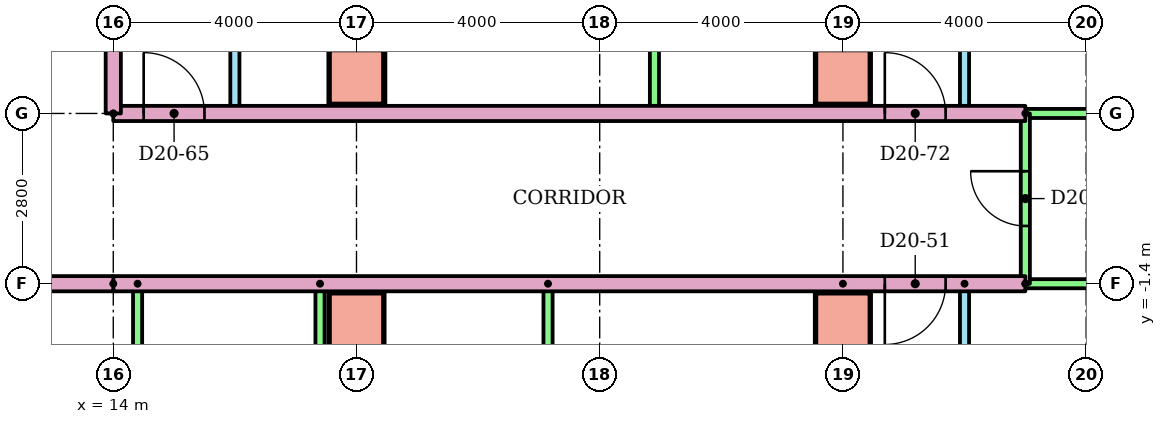
"""IFC4 building model, lengths in metres.
Left out: names, types, materials, properties, quantities, classifications, styles, units other than length and angle.
Written with IfcOpenShell. Run it as: python <this file> out.ifc"""

import sys

from ifc_helpers import new_model, si_unit, direction, frame, frame_2d, origin, origin_2d, place, context, subcontext, project, spatial, rectangle, extrude, element, fill, save


model = new_model("IFC4")
c1 = context("Model", 3, precision=1e-05, world=origin(), true_north=direction((0.0, 1.0)))
c2 = subcontext(c1, "Body", "Model", "MODEL_VIEW")
j1 = project(units=[si_unit("LENGTHUNIT", "METRE"), si_unit("PLANEANGLEUNIT", "RADIAN")], contexts=[c1])
p1 = place(None, origin())
s1 = spatial("IfcSite", under=j1, at=p1, CompositionType="ELEMENT")
p2 = place(p1, origin())
s2 = spatial("IfcBuilding", under=s1, at=p2, CompositionType="ELEMENT")
p3 = place(p2, frame((0.0, 0.0, 80.7)))
s3 = spatial("IfcBuildingStorey", under=s2, at=p3, CompositionType="ELEMENT", Elevation=80.7)
for number, where in (
    (1, (18.0, -2.0, 0.0)),
    (2, (26.0, -2.0, 0.0)),
    (3, (18.0, 2.0, 0.0)),
    (4, (26.0, 2.0, 0.0)),
):
    element("IfcColumn", number, at=place(p3, frame(where)), inside=s3, PredefinedType="COLUMN", context=c2, shape_type="SweptSolid", body=[
        extrude(rectangle(XDim=0.9, YDim=0.9, at=origin_2d()), origin(), (0.0, 0.0, 1.0), 3.2),
    ])
for number, where, z_axis, x_axis in (
    (5, (14.4, -1.4, 0.0), (0.0, 0.0, 1.0), (0.0, -1.0, 0.0)),
    (6, (17.4, -1.4, 0.0), (0.0, 0.0, 1.0), (0.0, -1.0, 0.0)),
    (7, (21.15, -1.4, 0.0), (0.0, 0.0, 1.0), (0.0, -1.0, 0.0)),
):
    element("IfcWall", number, at=place(p3, frame(where, z_axis=z_axis, x_axis=x_axis)), inside=s3, PredefinedType="PARTITIONING", context=c2, shape_type="SweptSolid", body=[
        extrude(rectangle(XDim=6.5, YDim=0.15, at=frame_2d((3.25, 0.0))), origin(), (0.0, 0.0, 1.0), 2.4),
    ])
p4 = place(p3, frame((28.0, -1.4, 0.0), z_axis=(0.0, 0.0, 1.0), x_axis=(0.0, -1.0, 0.0)))
e8 = element("IfcWall", 8, at=p4, inside=s3, PredefinedType="PARTITIONING", context=c2, shape_type="SweptSolid", body=[
    extrude(rectangle(XDim=6.5, YDim=0.15, at=frame_2d((3.25, 0.0))), origin(), (0.0, 0.0, 1.0), 2.4),
])
p5 = place(p4, frame((1.3, 0.0, 0.0)))
e9 = element("IfcOpeningElement", 9, at=p5, cuts=e8, PredefinedType="OPENING", context=c2, shape_type="SweptSolid", body=[
    extrude(rectangle(XDim=0.9, YDim=2.1, at=frame_2d((0.45, 1.05))), frame((0.0, 0.085, 0.0), z_axis=(0.0, -1.0, 0.0), x_axis=(1.0, 0.0, 0.0)), (0.0, 0.0, 1.0), 0.17),
])
p6 = place(p4, frame((4.6, 0.0, 0.0)))
e10 = element("IfcOpeningElement", 10, at=p6, cuts=e8, PredefinedType="OPENING", context=c2, shape_type="SweptSolid", body=[
    extrude(rectangle(XDim=0.8, YDim=2.1, at=frame_2d((0.4, 1.05))), frame((0.0, 0.085, 0.0), z_axis=(0.0, -1.0, 0.0), x_axis=(1.0, 0.0, 0.0)), (0.0, 0.0, 1.0), 0.17),
])
p7 = place(p3, frame((26.0, -1.4, 0.0), z_axis=(0.0, 0.0, 1.0), x_axis=(0.0, -1.0, 0.0)))
e11 = element("IfcWall", 11, at=p7, inside=s3, PredefinedType="PARTITIONING", context=c2, shape_type="SweptSolid", body=[
    extrude(rectangle(XDim=14.81, YDim=0.25, at=frame_2d((7.405, 0.0))), origin(), (0.0, 0.0, 1.0), 2.4),
])
p8 = place(p3, frame((29.0, -1.4, 0.0), z_axis=(0.0, 0.0, 1.0), x_axis=(-1.0, 0.0, 0.0)))
e12 = element("IfcWall", 12, at=p8, inside=s3, PredefinedType="PARTITIONING", context=c2, shape_type="SweptSolid", body=[
    extrude(rectangle(XDim=15.0, YDim=0.25, at=frame_2d((7.5, 0.0))), origin(), (0.0, 0.0, 1.0), 2.4),
])
p9 = place(p8, frame((1.311, 0.0, 0.0)))
e13 = element("IfcOpeningElement", 13, at=p9, cuts=e12, PredefinedType="OPENING", context=c2, shape_type="SweptSolid", body=[
    extrude(rectangle(XDim=1.0, YDim=2.1, at=frame_2d((0.5, 1.05))), frame((0.0, 0.135, 0.0), z_axis=(0.0, -1.0, 0.0), x_axis=(1.0, 0.0, 0.0)), (0.0, 0.0, 1.0), 0.27),
])
p10 = place(p3, frame((40.62, -1.4, 0.0), z_axis=(0.0, 0.0, 1.0), x_axis=(-1.0, 0.0, 0.0)))
e14 = element("IfcWall", 14, at=p10, inside=s3, PredefinedType="PARTITIONING", context=c2, shape_type="SweptSolid", body=[
    extrude(rectangle(XDim=11.62, YDim=0.15, at=frame_2d((5.81, 0.0))), origin(), (0.0, 0.0, 1.0), 2.4),
])
p11 = place(p3, frame((16.0, 10.3, 0.0), z_axis=(0.0, 0.0, 1.0), x_axis=(0.0, -1.0, 0.0)))
e15 = element("IfcWall", 15, at=p11, inside=s3, PredefinedType="PARTITIONING", context=c2, shape_type="SweptSolid", body=[
    extrude(rectangle(XDim=8.9, YDim=0.15, at=frame_2d((4.45, 0.0))), origin(), (0.0, 0.0, 1.0), 2.4),
])
p12 = place(p11, frame((5.95, 0.0, 0.0)))
e16 = element("IfcOpeningElement", 16, at=p12, cuts=e15, PredefinedType="OPENING", context=c2, shape_type="SweptSolid", body=[
    extrude(rectangle(XDim=0.9, YDim=2.1, at=frame_2d((0.45, 1.05))), frame((0.0, 0.085, 0.0), z_axis=(0.0, -1.0, 0.0), x_axis=(1.0, 0.0, 0.0)), (0.0, 0.0, 1.0), 0.17),
])
p13 = place(p11, frame((1.55, 0.0, 0.0)))
e17 = element("IfcOpeningElement", 17, at=p13, cuts=e15, PredefinedType="OPENING", context=c2, shape_type="SweptSolid", body=[
    extrude(rectangle(XDim=0.8, YDim=2.1, at=frame_2d((0.4, 1.05))), frame((0.0, 0.085, 0.0), z_axis=(0.0, -1.0, 0.0), x_axis=(1.0, 0.0, 0.0)), (0.0, 0.0, 1.0), 0.17),
])
for number, where, z_axis, x_axis in (
    (18, (18.4, 10.3, 0.0), (0.0, 0.0, 1.0), (0.0, -1.0, 0.0)),
    (19, (22.9, 10.3, 0.0), (0.0, 0.0, 1.0), (0.0, -1.0, 0.0)),
):
    element("IfcWall", number, at=place(p3, frame(where, z_axis=z_axis, x_axis=x_axis)), inside=s3, PredefinedType="PARTITIONING", context=c2, shape_type="SweptSolid", body=[
        extrude(rectangle(XDim=8.9, YDim=0.15, at=frame_2d((4.45, 0.0))), origin(), (0.0, 0.0, 1.0), 2.4),
    ])
p14 = place(p3, frame((28.0, 10.3, 0.0), z_axis=(0.0, 0.0, 1.0), x_axis=(0.0, -1.0, 0.0)))
e20 = element("IfcWall", 20, at=p14, inside=s3, PredefinedType="PARTITIONING", context=c2, shape_type="SweptSolid", body=[
    extrude(rectangle(XDim=8.9, YDim=0.15, at=frame_2d((4.45, 0.0))), origin(), (0.0, 0.0, 1.0), 2.4),
])
p15 = place(p14, frame((5.95, 0.0, 0.0)))
e21 = element("IfcOpeningElement", 21, at=p15, cuts=e20, PredefinedType="OPENING", context=c2, shape_type="SweptSolid", body=[
    extrude(rectangle(XDim=0.9, YDim=2.1, at=frame_2d((0.45, 1.05))), frame((0.0, 0.085, 0.0), z_axis=(0.0, -1.0, 0.0), x_axis=(1.0, 0.0, 0.0)), (0.0, 0.0, 1.0), 0.17),
])
p16 = place(p14, frame((1.55, 0.0, 0.0)))
e22 = element("IfcOpeningElement", 22, at=p16, cuts=e20, PredefinedType="OPENING", context=c2, shape_type="SweptSolid", body=[
    extrude(rectangle(XDim=0.8, YDim=2.1, at=frame_2d((0.4, 1.05))), frame((0.0, 0.085, 0.0), z_axis=(0.0, -1.0, 0.0), x_axis=(1.0, 0.0, 0.0)), (0.0, 0.0, 1.0), 0.17),
])
p17 = place(p3, frame((26.0, 18.621, 0.0), z_axis=(0.0, 0.0, 1.0), x_axis=(0.0, -1.0, 0.0)))
e23 = element("IfcWall", 23, at=p17, inside=s3, PredefinedType="PARTITIONING", context=c2, shape_type="SweptSolid", body=[
    extrude(rectangle(XDim=17.221, YDim=0.25, at=frame_2d((8.611, 0.0))), origin(), (0.0, 0.0, 1.0), 2.4),
])
p18 = place(p3, frame((14.0, 1.4, 0.0)))
e24 = element("IfcWall", 24, at=p18, inside=s3, PredefinedType="PARTITIONING", context=c2, shape_type="SweptSolid", body=[
    extrude(rectangle(XDim=15.0, YDim=0.25, at=frame_2d((7.5, 0.0))), origin(), (0.0, 0.0, 1.0), 2.4),
])
p19 = place(p18, frame((0.5, 0.0, 0.0)))
e25 = element("IfcOpeningElement", 25, at=p19, cuts=e24, PredefinedType="OPENING", context=c2, shape_type="SweptSolid", body=[
    extrude(rectangle(XDim=1.0, YDim=2.1, at=frame_2d((0.5, 1.05))), frame((0.0, 0.135, 0.0), z_axis=(0.0, -1.0, 0.0), x_axis=(1.0, 0.0, 0.0)), (0.0, 0.0, 1.0), 0.27),
])
p20 = place(p18, frame((12.689, 0.0, 0.0)))
e26 = element("IfcOpeningElement", 26, at=p20, cuts=e24, PredefinedType="OPENING", context=c2, shape_type="SweptSolid", body=[
    extrude(rectangle(XDim=1.0, YDim=2.1, at=frame_2d((0.5, 1.05))), frame((0.0, 0.135, 0.0), z_axis=(0.0, -1.0, 0.0), x_axis=(1.0, 0.0, 0.0)), (0.0, 0.0, 1.0), 0.27),
])
p21 = place(p3, frame((29.0, 1.4, 0.0)))
e27 = element("IfcWall", 27, at=p21, inside=s3, PredefinedType="PARTITIONING", context=c2, shape_type="SweptSolid", body=[
    extrude(rectangle(XDim=11.62, YDim=0.15, at=frame_2d((5.81, 0.0))), origin(), (0.0, 0.0, 1.0), 2.4),
])
p22 = place(p3, frame((29.0, -1.4, 0.0), z_axis=(0.0, 0.0, 1.0), x_axis=(0.0, 1.0, 0.0)))
e28 = element("IfcWall", 28, at=p22, inside=s3, PredefinedType="PARTITIONING", context=c2, shape_type="SweptSolid", body=[
    extrude(rectangle(XDim=2.8, YDim=0.15, at=frame_2d((1.4, 0.0))), origin(), (0.0, 0.0, 1.0), 2.4),
])
p23 = place(p22, frame((0.95, 0.0, 0.0)))
e29 = element("IfcOpeningElement", 29, at=p23, cuts=e28, PredefinedType="OPENING", context=c2, shape_type="SweptSolid", body=[
    extrude(rectangle(XDim=0.9, YDim=2.1, at=frame_2d((0.45, 1.05))), frame((0.0, 0.085, 0.0), z_axis=(0.0, -1.0, 0.0), x_axis=(1.0, 0.0, 0.0)), (0.0, 0.0, 1.0), 0.17),
])
p24 = place(p3, frame((14.0, -1.4, 0.0), z_axis=(0.0, 0.0, 1.0), x_axis=(-1.0, 0.0, 0.0)))
e30 = element("IfcWall", 30, at=p24, inside=s3, PredefinedType="PARTITIONING", context=c2, shape_type="SweptSolid", body=[
    extrude(rectangle(XDim=28.0, YDim=0.25, at=frame_2d((14.0, 0.0))), origin(), (0.0, 0.0, 1.0), 2.4),
])
p25 = place(p24, frame((20.689, 0.0, 0.0)))
e31 = element("IfcOpeningElement", 31, at=p25, cuts=e30, PredefinedType="OPENING", context=c2, shape_type="SweptSolid", body=[
    extrude(rectangle(XDim=1.0, YDim=2.1, at=frame_2d((0.5, 1.05))), frame((0.0, 0.135, 0.0), z_axis=(0.0, -1.0, 0.0), x_axis=(1.0, 0.0, 0.0)), (0.0, 0.0, 1.0), 0.27),
])
p26 = place(p24, frame((18.311, 0.0, 0.0)))
e32 = element("IfcOpeningElement", 32, at=p26, cuts=e30, PredefinedType="OPENING", context=c2, shape_type="SweptSolid", body=[
    extrude(rectangle(XDim=1.0, YDim=2.1, at=frame_2d((0.5, 1.05))), frame((0.0, 0.135, 0.0), z_axis=(0.0, -1.0, 0.0), x_axis=(1.0, 0.0, 0.0)), (0.0, 0.0, 1.0), 0.27),
])
p27 = place(p24, frame((2.311, 0.0, 0.0)))
e33 = element("IfcOpeningElement", 33, at=p27, cuts=e30, PredefinedType="OPENING", context=c2, shape_type="SweptSolid", body=[
    extrude(rectangle(XDim=1.0, YDim=2.1, at=frame_2d((0.5, 1.05))), frame((0.0, 0.135, 0.0), z_axis=(0.0, -1.0, 0.0), x_axis=(1.0, 0.0, 0.0)), (0.0, 0.0, 1.0), 0.27),
])
p28 = place(p3, frame((14.0, 1.4, 0.0), z_axis=(0.0, 0.0, 1.0), x_axis=(0.0, 1.0, 0.0)))
e34 = element("IfcWall", 34, at=p28, inside=s3, PredefinedType="PARTITIONING", context=c2, shape_type="SweptSolid", body=[
    extrude(rectangle(XDim=1.6, YDim=0.25, at=frame_2d((0.8, 0.0))), origin(), (0.0, 0.0, 1.0), 2.4),
])
p29 = place(p9, origin())
e35 = element("IfcDoor", 35, at=p29, inside=s3, OperationType="SINGLE_SWING_RIGHT", PredefinedType="DOOR", context=c2, shape_type="SweptSolid", body=[
    extrude(rectangle(XDim=1.0, YDim=2.1, at=frame_2d((0.5, 1.05))), frame((0.0, 0.025, 0.0), z_axis=(0.0, -1.0, 0.0), x_axis=(1.0, 0.0, 0.0)), (0.0, 0.0, 1.0), 0.05),
])
fill(e13, e35)
p30 = place(p19, origin())
e36 = element("IfcDoor", 36, at=p30, inside=s3, OperationType="SINGLE_SWING_LEFT", PredefinedType="DOOR", context=c2, shape_type="SweptSolid", body=[
    extrude(rectangle(XDim=1.0, YDim=2.1, at=frame_2d((0.5, 1.05))), frame((0.0, 0.025, 0.0), z_axis=(0.0, -1.0, 0.0), x_axis=(1.0, 0.0, 0.0)), (0.0, 0.0, 1.0), 0.05),
])
fill(e25, e36)
p31 = place(p20, origin())
e37 = element("IfcDoor", 37, at=p31, inside=s3, OperationType="SINGLE_SWING_LEFT", PredefinedType="DOOR", context=c2, shape_type="SweptSolid", body=[
    extrude(rectangle(XDim=1.0, YDim=2.1, at=frame_2d((0.5, 1.05))), frame((0.0, 0.025, 0.0), z_axis=(0.0, -1.0, 0.0), x_axis=(1.0, 0.0, 0.0)), (0.0, 0.0, 1.0), 0.05),
])
fill(e26, e37)
p32 = place(p23, origin())
e38 = element("IfcDoor", 38, at=p32, inside=s3, OperationType="SINGLE_SWING_RIGHT", PredefinedType="DOOR", context=c2, shape_type="SweptSolid", body=[
    extrude(rectangle(XDim=0.9, YDim=2.1, at=frame_2d((0.45, 1.05))), frame((0.0, 0.025, 0.0), z_axis=(0.0, -1.0, 0.0), x_axis=(1.0, 0.0, 0.0)), (0.0, 0.0, 1.0), 0.05),
])
fill(e29, e38)
save(model, sys.argv[1])
